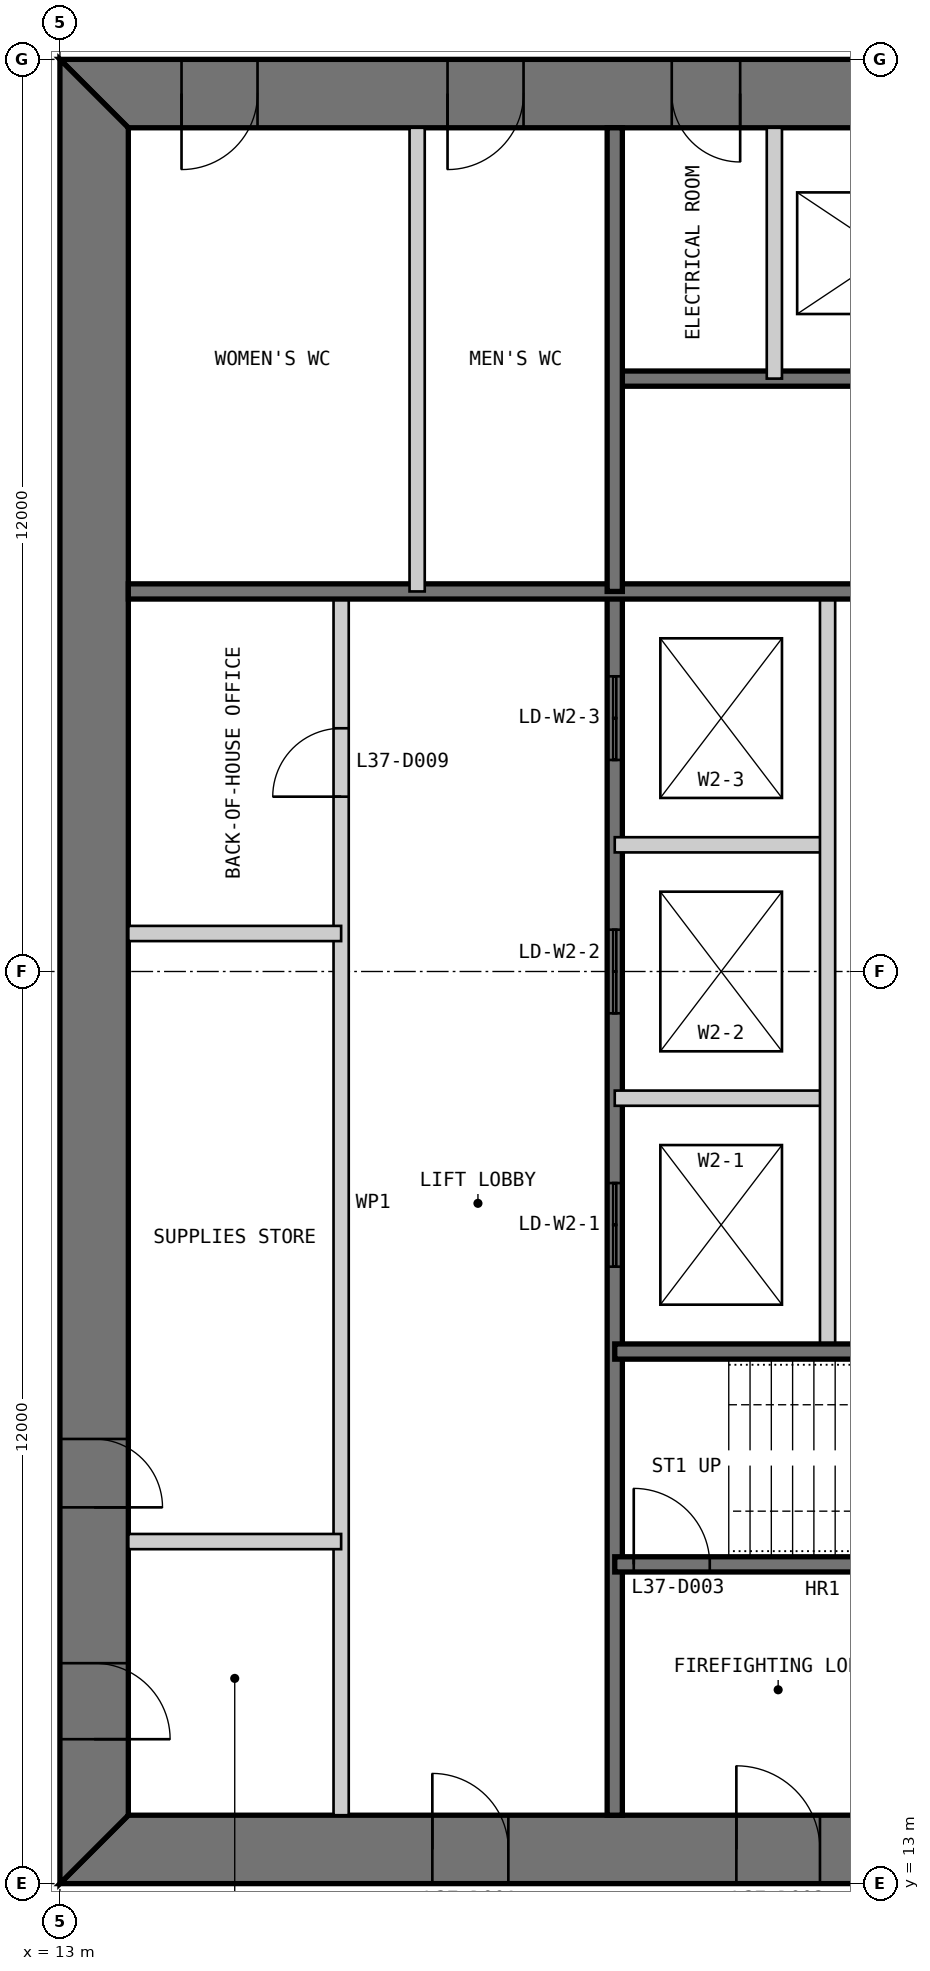
"""IFC4 building model, lengths in metres.
Left out: names, types, materials, properties, quantities, classifications, styles, units other than length and angle.
Written with IfcOpenShell. Run it as: python <this file> out.ifc"""

import sys

from ifc_helpers import new_model, si_unit, direction, frame, frame_2d, origin, place, context, subcontext, project, spatial, polyline, rectangle, outline, extrude, element, fill, save


model = new_model("IFC4")
c1 = context("Model", 3, precision=1e-05, world=origin(), true_north=direction((0.0, 1.0)))
c2 = subcontext(c1, "Body", "Model", "MODEL_VIEW")
j1 = project(units=[si_unit("LENGTHUNIT", "METRE"), si_unit("PLANEANGLEUNIT", "RADIAN")], contexts=[c1])
p1 = place(None, origin())
s1 = spatial("IfcSite", under=j1, at=p1, CompositionType="ELEMENT")
p2 = place(p1, origin())
s2 = spatial("IfcBuilding", under=s1, at=p2, CompositionType="ELEMENT")
p3 = place(p2, frame((0.0, 0.0, 158.4)))
s3 = spatial("IfcBuildingStorey", under=s2, at=p3, CompositionType="ELEMENT", Elevation=158.4)
p4 = place(p3, frame((13.0, 13.45, 0.0), z_axis=(0.0, 0.0, 1.0), x_axis=(1.0, 0.0, 0.0)))
e1 = element("IfcWall", 1, at=p4, inside=s3, PredefinedType="SHEAR", context=c2, shape_type="SweptSolid", body=[
    extrude(outline(polyline([(0.0, -0.45), (24.0, -0.45), (23.1, 0.45), (0.9, 0.45), (0.0, -0.45)])), origin(), (0.0, 0.0, 1.0), 4.0),
])
p5 = place(p4, frame((4.9, 0.0, 0.0)))
e2 = element("IfcOpeningElement", 2, at=p5, cuts=e1, PredefinedType="OPENING", context=c2, shape_type="SweptSolid", body=[
    extrude(rectangle(XDim=1.0, YDim=2.2, at=frame_2d((0.5, 1.1))), frame((0.0, 0.46, 0.0), z_axis=(0.0, -1.0, 0.0), x_axis=(1.0, 0.0, 0.0)), (0.0, 0.0, 1.0), 0.92),
])
p6 = place(p4, frame((8.9, 0.0, 0.0)))
e3 = element("IfcOpeningElement", 3, at=p6, cuts=e1, PredefinedType="OPENING", context=c2, shape_type="SweptSolid", body=[
    extrude(rectangle(XDim=1.1, YDim=2.2, at=frame_2d((0.55, 1.1))), frame((0.0, 0.46, 0.0), z_axis=(0.0, -1.0, 0.0), x_axis=(1.0, 0.0, 0.0)), (0.0, 0.0, 1.0), 0.92),
])
p7 = place(p4, frame((15.05, 0.0, 0.0)))
e4 = element("IfcOpeningElement", 4, at=p7, cuts=e1, PredefinedType="OPENING", context=c2, shape_type="SweptSolid", body=[
    extrude(rectangle(XDim=0.9, YDim=2.2, at=frame_2d((0.45, 1.1))), frame((0.0, 0.46, 0.0), z_axis=(0.0, -1.0, 0.0), x_axis=(1.0, 0.0, 0.0)), (0.0, 0.0, 1.0), 0.92),
])
p8 = place(p4, frame((17.9, 0.0, 0.0)))
e5 = element("IfcOpeningElement", 5, at=p8, cuts=e1, PredefinedType="OPENING", context=c2, shape_type="SweptSolid", body=[
    extrude(rectangle(XDim=1.0, YDim=2.2, at=frame_2d((0.5, 1.1))), frame((0.0, 0.46, 0.0), z_axis=(0.0, -1.0, 0.0), x_axis=(1.0, 0.0, 0.0)), (0.0, 0.0, 1.0), 0.92),
])
p9 = place(p4, frame((21.4, 0.0, 0.0)))
e6 = element("IfcOpeningElement", 6, at=p9, cuts=e1, PredefinedType="OPENING", context=c2, shape_type="SweptSolid", body=[
    extrude(rectangle(XDim=1.0, YDim=2.2, at=frame_2d((0.5, 1.1))), frame((0.0, 0.46, 0.0), z_axis=(0.0, -1.0, 0.0), x_axis=(1.0, 0.0, 0.0)), (0.0, 0.0, 1.0), 0.92),
])
p10 = place(p3, frame((37.0, 36.55, 0.0), z_axis=(0.0, 0.0, 1.0), x_axis=(-1.0, 0.0, 0.0)))
e7 = element("IfcWall", 7, at=p10, inside=s3, PredefinedType="SHEAR", context=c2, shape_type="SweptSolid", body=[
    extrude(outline(polyline([(0.0, -0.45), (24.0, -0.45), (23.1, 0.45), (0.9, 0.45), (0.0, -0.45)])), origin(), (0.0, 0.0, 1.0), 4.0),
])
p11 = place(p10, frame((4.9, 0.0, 0.0)))
e8 = element("IfcOpeningElement", 8, at=p11, cuts=e7, PredefinedType="OPENING", context=c2, shape_type="SweptSolid", body=[
    extrude(rectangle(XDim=1.0, YDim=2.2, at=frame_2d((0.5, 1.1))), frame((0.0, 0.46, 0.0), z_axis=(0.0, -1.0, 0.0), x_axis=(1.0, 0.0, 0.0)), (0.0, 0.0, 1.0), 0.92),
])
p12 = place(p10, frame((8.9, 0.0, 0.0)))
e9 = element("IfcOpeningElement", 9, at=p12, cuts=e7, PredefinedType="OPENING", context=c2, shape_type="SweptSolid", body=[
    extrude(rectangle(XDim=1.1, YDim=2.2, at=frame_2d((0.55, 1.1))), frame((0.0, 0.46, 0.0), z_axis=(0.0, -1.0, 0.0), x_axis=(1.0, 0.0, 0.0)), (0.0, 0.0, 1.0), 0.92),
])
p13 = place(p10, frame((15.05, 0.0, 0.0)))
e10 = element("IfcOpeningElement", 10, at=p13, cuts=e7, PredefinedType="OPENING", context=c2, shape_type="SweptSolid", body=[
    extrude(rectangle(XDim=0.9, YDim=2.2, at=frame_2d((0.45, 1.1))), frame((0.0, 0.46, 0.0), z_axis=(0.0, -1.0, 0.0), x_axis=(1.0, 0.0, 0.0)), (0.0, 0.0, 1.0), 0.92),
])
p14 = place(p10, frame((17.9, 0.0, 0.0)))
e11 = element("IfcOpeningElement", 11, at=p14, cuts=e7, PredefinedType="OPENING", context=c2, shape_type="SweptSolid", body=[
    extrude(rectangle(XDim=1.0, YDim=2.2, at=frame_2d((0.5, 1.1))), frame((0.0, 0.46, 0.0), z_axis=(0.0, -1.0, 0.0), x_axis=(1.0, 0.0, 0.0)), (0.0, 0.0, 1.0), 0.92),
])
p15 = place(p10, frame((21.4, 0.0, 0.0)))
e12 = element("IfcOpeningElement", 12, at=p15, cuts=e7, PredefinedType="OPENING", context=c2, shape_type="SweptSolid", body=[
    extrude(rectangle(XDim=1.0, YDim=2.2, at=frame_2d((0.5, 1.1))), frame((0.0, 0.46, 0.0), z_axis=(0.0, -1.0, 0.0), x_axis=(1.0, 0.0, 0.0)), (0.0, 0.0, 1.0), 0.92),
])
p16 = place(p3, frame((13.45, 36.1, 0.0), z_axis=(0.0, 0.0, 1.0), x_axis=(0.0, -1.0, 0.0)))
e13 = element("IfcWall", 13, at=p16, inside=s3, PredefinedType="SHEAR", context=c2, shape_type="SweptSolid", body=[
    extrude(outline(polyline([(-0.9, -0.45), (23.1, -0.45), (22.2, 0.45), (0.0, 0.45), (-0.9, -0.45)])), origin(), (0.0, 0.0, 1.0), 4.0),
])
p17 = place(p16, frame((20.2, 0.0, 0.0)))
e14 = element("IfcOpeningElement", 14, at=p17, cuts=e13, PredefinedType="OPENING", context=c2, shape_type="SweptSolid", body=[
    extrude(rectangle(XDim=1.0, YDim=2.2, at=frame_2d((0.5, 1.1))), frame((0.0, 0.46, 0.0), z_axis=(0.0, -1.0, 0.0), x_axis=(1.0, 0.0, 0.0)), (0.0, 0.0, 1.0), 0.92),
])
p18 = place(p16, frame((17.25, 0.0, 0.0)))
e15 = element("IfcOpeningElement", 15, at=p18, cuts=e13, PredefinedType="OPENING", context=c2, shape_type="SweptSolid", body=[
    extrude(rectangle(XDim=0.9, YDim=2.2, at=frame_2d((0.45, 1.1))), frame((0.0, 0.46, 0.0), z_axis=(0.0, -1.0, 0.0), x_axis=(1.0, 0.0, 0.0)), (0.0, 0.0, 1.0), 0.92),
])
p19 = place(p3, frame((16.7, 13.9, 0.0), z_axis=(0.0, 0.0, 1.0), x_axis=(0.0, 1.0, 0.0)))
e16 = element("IfcWall", 16, at=p19, inside=s3, PredefinedType="PARTITIONING", context=c2, shape_type="SweptSolid", body=[
    extrude(rectangle(XDim=16.1, YDim=0.2, at=frame_2d((8.05, 0.0))), origin(), (0.0, 0.0, 1.0), 3.8),
])
p20 = place(p19, frame((13.4, 0.0, 0.0)))
e17 = element("IfcOpeningElement", 17, at=p20, cuts=e16, PredefinedType="OPENING", context=c2, shape_type="SweptSolid", body=[
    extrude(rectangle(XDim=0.9, YDim=2.2, at=frame_2d((0.45, 1.1))), frame((0.0, 0.11, 0.0), z_axis=(0.0, -1.0, 0.0), x_axis=(1.0, 0.0, 0.0)), (0.0, 0.0, 1.0), 0.22),
])
p21 = place(p3, frame((20.3, 13.9, 0.0), z_axis=(0.0, 0.0, 1.0), x_axis=(0.0, 1.0, 0.0)))
e18 = element("IfcWall", 18, at=p21, inside=s3, PredefinedType="SOLIDWALL", context=c2, shape_type="SweptSolid", body=[
    extrude(rectangle(XDim=16.1, YDim=0.2, at=frame_2d((8.05, 0.0))), origin(), (0.0, 0.0, 1.0), 3.8),
])
p22 = place(p21, frame((7.217, 0.0, 0.0)))
e19 = element("IfcOpeningElement", 19, at=p22, cuts=e18, PredefinedType="OPENING", context=c2, shape_type="SweptSolid", body=[
    extrude(rectangle(XDim=1.1, YDim=2.2, at=frame_2d((0.55, 1.1))), frame((0.0, 0.11, 0.0), z_axis=(0.0, -1.0, 0.0), x_axis=(1.0, 0.0, 0.0)), (0.0, 0.0, 1.0), 0.22),
])
p23 = place(p21, frame((10.55, 0.0, 0.0)))
e20 = element("IfcOpeningElement", 20, at=p23, cuts=e18, PredefinedType="OPENING", context=c2, shape_type="SweptSolid", body=[
    extrude(rectangle(XDim=1.1, YDim=2.2, at=frame_2d((0.55, 1.1))), frame((0.0, 0.11, 0.0), z_axis=(0.0, -1.0, 0.0), x_axis=(1.0, 0.0, 0.0)), (0.0, 0.0, 1.0), 0.22),
])
p24 = place(p21, frame((13.883, 0.0, 0.0)))
e21 = element("IfcOpeningElement", 21, at=p24, cuts=e18, PredefinedType="OPENING", context=c2, shape_type="SweptSolid", body=[
    extrude(rectangle(XDim=1.1, YDim=2.2, at=frame_2d((0.55, 1.1))), frame((0.0, 0.11, 0.0), z_axis=(0.0, -1.0, 0.0), x_axis=(1.0, 0.0, 0.0)), (0.0, 0.0, 1.0), 0.22),
])
for number, where, z_axis, x_axis in (
    (22, (20.3, 23.333, 0.0), (0.0, 0.0, 1.0), (1.0, 0.0, 0.0)),
    (23, (20.3, 26.667, 0.0), (0.0, 0.0, 1.0), (1.0, 0.0, 0.0)),
):
    element("IfcWall", number, at=place(p3, frame(where, z_axis=z_axis, x_axis=x_axis)), inside=s3, PredefinedType="PARTITIONING", context=c2, shape_type="SweptSolid", body=[
        extrude(rectangle(XDim=2.8, YDim=0.2, at=frame_2d((1.4, 0.0))), origin(), (0.0, 0.0, 1.0), 3.8),
    ])
p25 = place(p3, frame((23.1, 20.0, 0.0), z_axis=(0.0, 0.0, 1.0), x_axis=(0.0, 1.0, 0.0)))
e24 = element("IfcWall", 24, at=p25, inside=s3, PredefinedType="PARTITIONING", context=c2, shape_type="SweptSolid", body=[
    extrude(rectangle(XDim=10.0, YDim=0.2, at=frame_2d((5.0, 0.0))), origin(), (0.0, 0.0, 1.0), 3.8),
])
p26 = place(p3, frame((20.3, 17.2, 0.0), z_axis=(0.0, 0.0, 1.0), x_axis=(1.0, 0.0, 0.0)))
e25 = element("IfcWall", 25, at=p26, inside=s3, PredefinedType="SOLIDWALL", context=c2, shape_type="SweptSolid", body=[
    extrude(rectangle(XDim=9.4, YDim=0.2, at=frame_2d((4.7, 0.0))), origin(), (0.0, 0.0, 1.0), 3.8),
])
p27 = place(p26, frame((0.25, 0.0, 0.0)))
e26 = element("IfcOpeningElement", 26, at=p27, cuts=e25, PredefinedType="OPENING", context=c2, shape_type="SweptSolid", body=[
    extrude(rectangle(XDim=1.0, YDim=2.2, at=frame_2d((0.5, 1.1))), frame((0.0, 0.11, 0.0), z_axis=(0.0, -1.0, 0.0), x_axis=(1.0, 0.0, 0.0)), (0.0, 0.0, 1.0), 0.22),
])
p28 = place(p3, frame((20.3, 20.0, 0.0), z_axis=(0.0, 0.0, 1.0), x_axis=(1.0, 0.0, 0.0)))
e27 = element("IfcWall", 27, at=p28, inside=s3, PredefinedType="SOLIDWALL", context=c2, shape_type="SweptSolid", body=[
    extrude(rectangle(XDim=15.8, YDim=0.2, at=frame_2d((7.9, 0.0))), origin(), (0.0, 0.0, 1.0), 3.8),
])
for number, where, z_axis, x_axis in (
    (28, (13.9, 17.5, 0.0), (0.0, 0.0, 1.0), (1.0, 0.0, 0.0)),
    (29, (13.9, 25.5, 0.0), (0.0, 0.0, 1.0), (1.0, 0.0, 0.0)),
):
    element("IfcWall", number, at=place(p3, frame(where, z_axis=z_axis, x_axis=x_axis)), inside=s3, PredefinedType="PARTITIONING", context=c2, shape_type="SweptSolid", body=[
        extrude(rectangle(XDim=2.8, YDim=0.2, at=frame_2d((1.4, 0.0))), origin(), (0.0, 0.0, 1.0), 3.8),
    ])
p29 = place(p3, frame((29.7, 32.8, 0.0), z_axis=(0.0, 0.0, 1.0), x_axis=(-1.0, 0.0, 0.0)))
e30 = element("IfcWall", 30, at=p29, inside=s3, PredefinedType="SOLIDWALL", context=c2, shape_type="SweptSolid", body=[
    extrude(rectangle(XDim=9.4, YDim=0.2, at=frame_2d((4.7, 0.0))), origin(), (0.0, 0.0, 1.0), 3.8),
])
p30 = place(p29, frame((0.25, 0.0, 0.0)))
e31 = element("IfcOpeningElement", 31, at=p30, cuts=e30, PredefinedType="OPENING", context=c2, shape_type="SweptSolid", body=[
    extrude(rectangle(XDim=1.0, YDim=2.2, at=frame_2d((0.5, 1.1))), frame((0.0, 0.11, 0.0), z_axis=(0.0, -1.0, 0.0), x_axis=(1.0, 0.0, 0.0)), (0.0, 0.0, 1.0), 0.22),
])
p31 = place(p3, frame((29.7, 30.0, 0.0), z_axis=(0.0, 0.0, 1.0), x_axis=(-1.0, 0.0, 0.0)))
e32 = element("IfcWall", 32, at=p31, inside=s3, PredefinedType="SOLIDWALL", context=c2, shape_type="SweptSolid", body=[
    extrude(rectangle(XDim=15.8, YDim=0.2, at=frame_2d((7.9, 0.0))), origin(), (0.0, 0.0, 1.0), 3.8),
])
p32 = place(p3, frame((22.4, 36.1, 0.0), z_axis=(0.0, 0.0, 1.0), x_axis=(0.0, -1.0, 0.0)))
e33 = element("IfcWall", 33, at=p32, inside=s3, PredefinedType="PARTITIONING", context=c2, shape_type="SweptSolid", body=[
    extrude(rectangle(XDim=3.3, YDim=0.2, at=frame_2d((1.65, 0.0))), origin(), (0.0, 0.0, 1.0), 3.8),
])
p33 = place(p3, frame((20.3, 36.1, 0.0), z_axis=(0.0, 0.0, 1.0), x_axis=(0.0, -1.0, 0.0)))
e34 = element("IfcWall", 34, at=p33, inside=s3, PredefinedType="SOLIDWALL", context=c2, shape_type="SweptSolid", body=[
    extrude(rectangle(XDim=6.1, YDim=0.2, at=frame_2d((3.05, 0.0))), origin(), (0.0, 0.0, 1.0), 3.8),
])
p34 = place(p3, frame((17.7, 36.1, 0.0), z_axis=(0.0, 0.0, 1.0), x_axis=(0.0, -1.0, 0.0)))
e35 = element("IfcWall", 35, at=p34, inside=s3, PredefinedType="PARTITIONING", context=c2, shape_type="SweptSolid", body=[
    extrude(rectangle(XDim=6.1, YDim=0.2, at=frame_2d((3.05, 0.0))), origin(), (0.0, 0.0, 1.0), 3.8),
])
p35 = place(p5, origin())
e36 = element("IfcDoor", 36, at=p35, inside=s3, OperationType="SINGLE_SWING_LEFT", PredefinedType="DOOR", context=c2, shape_type="SweptSolid", body=[
    extrude(rectangle(XDim=1.0, YDim=2.2, at=frame_2d((0.5, 1.1))), frame((0.0, 0.025, 0.0), z_axis=(0.0, -1.0, 0.0), x_axis=(1.0, 0.0, 0.0)), (0.0, 0.0, 1.0), 0.05),
    extrude(outline(polyline([(0.0, 0.0), (0.04, 0.0), (0.04, 2.16), (0.96, 2.16), (0.96, 0.0), (1.0, 0.0), (1.0, 2.2), (0.0, 2.2), (0.0, 0.0)])), frame((0.0, 0.3, 0.0), z_axis=(0.0, -1.0, 0.0), x_axis=(1.0, 0.0, 0.0)), (0.0, 0.0, 1.0), 0.6),
])
fill(e2, e36)
p36 = place(p6, origin())
e37 = element("IfcDoor", 37, at=p36, inside=s3, OperationType="SINGLE_SWING_LEFT", PredefinedType="DOOR", context=c2, shape_type="SweptSolid", body=[
    extrude(rectangle(XDim=1.1, YDim=2.2, at=frame_2d((0.55, 1.1))), frame((0.0, 0.025, 0.0), z_axis=(0.0, -1.0, 0.0), x_axis=(1.0, 0.0, 0.0)), (0.0, 0.0, 1.0), 0.05),
    extrude(outline(polyline([(0.0, 0.0), (0.04, 0.0), (0.04, 2.16), (1.06, 2.16), (1.06, 0.0), (1.1, 0.0), (1.1, 2.2), (0.0, 2.2), (0.0, 0.0)])), frame((0.0, 0.3, 0.0), z_axis=(0.0, -1.0, 0.0), x_axis=(1.0, 0.0, 0.0)), (0.0, 0.0, 1.0), 0.6),
])
fill(e3, e37)
p37 = place(p27, origin())
e38 = element("IfcDoor", 38, at=p37, inside=s3, OperationType="SINGLE_SWING_LEFT", PredefinedType="DOOR", context=c2, shape_type="SweptSolid", body=[
    extrude(rectangle(XDim=1.0, YDim=2.2, at=frame_2d((0.5, 1.1))), frame((0.0, 0.025, 0.0), z_axis=(0.0, -1.0, 0.0), x_axis=(1.0, 0.0, 0.0)), (0.0, 0.0, 1.0), 0.05),
])
fill(e26, e38)
p38 = place(p17, origin())
e39 = element("IfcDoor", 39, at=p38, inside=s3, OperationType="SINGLE_SWING_RIGHT", PredefinedType="DOOR", context=c2, shape_type="SweptSolid", body=[
    extrude(rectangle(XDim=1.0, YDim=2.2, at=frame_2d((0.5, 1.1))), frame((0.0, 0.025, 0.0), z_axis=(0.0, -1.0, 0.0), x_axis=(1.0, 0.0, 0.0)), (0.0, 0.0, 1.0), 0.05),
    extrude(outline(polyline([(0.0, 0.0), (0.04, 0.0), (0.04, 2.16), (0.96, 2.16), (0.96, 0.0), (1.0, 0.0), (1.0, 2.2), (0.0, 2.2), (0.0, 0.0)])), frame((0.0, 0.3, 0.0), z_axis=(0.0, -1.0, 0.0), x_axis=(1.0, 0.0, 0.0)), (0.0, 0.0, 1.0), 0.6),
])
fill(e14, e39)
p39 = place(p18, origin())
e40 = element("IfcDoor", 40, at=p39, inside=s3, OperationType="SINGLE_SWING_RIGHT", PredefinedType="DOOR", context=c2, shape_type="SweptSolid", body=[
    extrude(rectangle(XDim=0.9, YDim=2.2, at=frame_2d((0.45, 1.1))), frame((0.0, 0.025, 0.0), z_axis=(0.0, -1.0, 0.0), x_axis=(1.0, 0.0, 0.0)), (0.0, 0.0, 1.0), 0.05),
    extrude(outline(polyline([(0.0, 0.0), (0.04, 0.0), (0.04, 2.16), (0.86, 2.16), (0.86, 0.0), (0.9, 0.0), (0.9, 2.2), (0.0, 2.2), (0.0, 0.0)])), frame((0.0, 0.3, 0.0), z_axis=(0.0, -1.0, 0.0), x_axis=(1.0, 0.0, 0.0)), (0.0, 0.0, 1.0), 0.6),
])
fill(e15, e40)
p40 = place(p20, origin())
e41 = element("IfcDoor", 41, at=p40, inside=s3, OperationType="SINGLE_SWING_LEFT", PredefinedType="DOOR", context=c2, shape_type="SweptSolid", body=[
    extrude(rectangle(XDim=0.9, YDim=2.2, at=frame_2d((0.45, 1.1))), frame((0.0, 0.025, 0.0), z_axis=(0.0, -1.0, 0.0), x_axis=(1.0, 0.0, 0.0)), (0.0, 0.0, 1.0), 0.05),
])
fill(e17, e41)
p41 = place(p13, origin())
e42 = element("IfcDoor", 42, at=p41, inside=s3, OperationType="SINGLE_SWING_LEFT", PredefinedType="DOOR", context=c2, shape_type="SweptSolid", body=[
    extrude(rectangle(XDim=0.9, YDim=2.2, at=frame_2d((0.45, 1.1))), frame((0.0, 0.025, 0.0), z_axis=(0.0, -1.0, 0.0), x_axis=(1.0, 0.0, 0.0)), (0.0, 0.0, 1.0), 0.05),
    extrude(outline(polyline([(0.0, 0.0), (0.04, 0.0), (0.04, 2.16), (0.86, 2.16), (0.86, 0.0), (0.9, 0.0), (0.9, 2.2), (0.0, 2.2), (0.0, 0.0)])), frame((0.0, 0.3, 0.0), z_axis=(0.0, -1.0, 0.0), x_axis=(1.0, 0.0, 0.0)), (0.0, 0.0, 1.0), 0.6),
])
fill(e10, e42)
p42 = place(p14, origin())
e43 = element("IfcDoor", 43, at=p42, inside=s3, OperationType="SINGLE_SWING_RIGHT", PredefinedType="DOOR", context=c2, shape_type="SweptSolid", body=[
    extrude(rectangle(XDim=1.0, YDim=2.2, at=frame_2d((0.5, 1.1))), frame((0.0, 0.025, 0.0), z_axis=(0.0, -1.0, 0.0), x_axis=(1.0, 0.0, 0.0)), (0.0, 0.0, 1.0), 0.05),
    extrude(outline(polyline([(0.0, 0.0), (0.04, 0.0), (0.04, 2.16), (0.96, 2.16), (0.96, 0.0), (1.0, 0.0), (1.0, 2.2), (0.0, 2.2), (0.0, 0.0)])), frame((0.0, 0.3, 0.0), z_axis=(0.0, -1.0, 0.0), x_axis=(1.0, 0.0, 0.0)), (0.0, 0.0, 1.0), 0.6),
])
fill(e11, e43)
p43 = place(p15, origin())
e44 = element("IfcDoor", 44, at=p43, inside=s3, OperationType="SINGLE_SWING_RIGHT", PredefinedType="DOOR", context=c2, shape_type="SweptSolid", body=[
    extrude(rectangle(XDim=1.0, YDim=2.2, at=frame_2d((0.5, 1.1))), frame((0.0, 0.025, 0.0), z_axis=(0.0, -1.0, 0.0), x_axis=(1.0, 0.0, 0.0)), (0.0, 0.0, 1.0), 0.05),
    extrude(outline(polyline([(0.0, 0.0), (0.04, 0.0), (0.04, 2.16), (0.96, 2.16), (0.96, 0.0), (1.0, 0.0), (1.0, 2.2), (0.0, 2.2), (0.0, 0.0)])), frame((0.0, 0.3, 0.0), z_axis=(0.0, -1.0, 0.0), x_axis=(1.0, 0.0, 0.0)), (0.0, 0.0, 1.0), 0.6),
])
fill(e12, e44)
p44 = place(p22, origin())
e45 = element("IfcDoor", 45, at=p44, inside=s3, OperationType="DOUBLE_DOOR_SLIDING", PredefinedType="DOOR", context=c2, shape_type="SweptSolid", body=[
    extrude(rectangle(XDim=1.1, YDim=2.2, at=frame_2d((0.55, 1.1))), frame((0.0, 0.025, 0.0), z_axis=(0.0, -1.0, 0.0), x_axis=(1.0, 0.0, 0.0)), (0.0, 0.0, 1.0), 0.05),
])
fill(e19, e45)
p45 = place(p23, origin())
e46 = element("IfcDoor", 46, at=p45, inside=s3, OperationType="DOUBLE_DOOR_SLIDING", PredefinedType="DOOR", context=c2, shape_type="SweptSolid", body=[
    extrude(rectangle(XDim=1.1, YDim=2.2, at=frame_2d((0.55, 1.1))), frame((0.0, 0.025, 0.0), z_axis=(0.0, -1.0, 0.0), x_axis=(1.0, 0.0, 0.0)), (0.0, 0.0, 1.0), 0.05),
])
fill(e20, e46)
p46 = place(p24, origin())
e47 = element("IfcDoor", 47, at=p46, inside=s3, OperationType="DOUBLE_DOOR_SLIDING", PredefinedType="DOOR", context=c2, shape_type="SweptSolid", body=[
    extrude(rectangle(XDim=1.1, YDim=2.2, at=frame_2d((0.55, 1.1))), frame((0.0, 0.025, 0.0), z_axis=(0.0, -1.0, 0.0), x_axis=(1.0, 0.0, 0.0)), (0.0, 0.0, 1.0), 0.05),
])
fill(e21, e47)
save(model, sys.argv[1])
